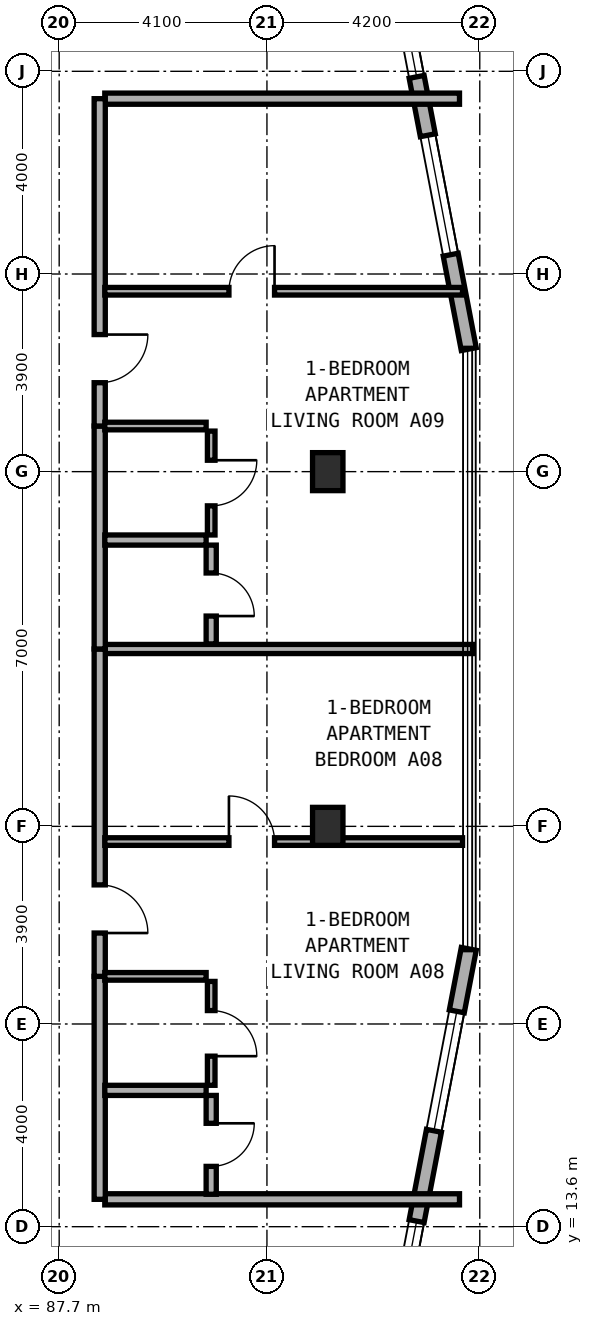
"""IFC4 building model, lengths in metres.
Left out: names, types, materials, properties, quantities, classifications, styles, units other than length and angle.
Written with IfcOpenShell. Run it as: python <this file> out.ifc"""

import sys

from ifc_helpers import new_model, si_unit, direction, frame, frame_2d, origin, origin_2d, place, context, subcontext, project, spatial, rectangle, extrude, element, fill, save


model = new_model("IFC4")
c1 = context("Model", 3, precision=1e-05, world=origin(), true_north=direction((0.0, 1.0)))
c2 = subcontext(c1, "Body", "Model", "MODEL_VIEW")
j1 = project(units=[si_unit("LENGTHUNIT", "METRE"), si_unit("PLANEANGLEUNIT", "RADIAN")], contexts=[c1])
p1 = place(None, origin())
s1 = spatial("IfcSite", under=j1, at=p1, CompositionType="ELEMENT")
p2 = place(p1, origin())
s2 = spatial("IfcBuilding", under=s1, at=p2, CompositionType="ELEMENT")
p3 = place(p2, frame((0.0, 0.0, 73.0)))
s3 = spatial("IfcBuildingStorey", under=s2, at=p3, CompositionType="ELEMENT", Elevation=73.0)
for number, where, z_axis, x_axis in (
    (1, (93.0, 21.5, 0.0), (0.0, 0.0, 1.0), (1.0, 0.0, 0.0)),
    (2, (93.0, 28.5, 0.0), (0.0, 0.0, 1.0), (1.0, 0.0, 0.0)),
):
    element("IfcColumn", number, at=place(p3, frame(where, z_axis=z_axis, x_axis=x_axis)), inside=s3, PredefinedType="COLUMN", context=c2, shape_type="SweptSolid", body=[
        extrude(rectangle(XDim=0.6, YDim=0.75, at=origin_2d()), origin(), (0.0, 0.0, 1.0), 3.5),
    ])
p4 = place(p3, frame((93.971, 9.62, 0.0), z_axis=(0.0, 0.0, 1.0), x_axis=(0.188087874316, 0.982152203854, 0.0)))
e3 = element("IfcWall", 3, at=p4, inside=s3, PredefinedType="STANDARD", context=c2, shape_type="SweptSolid", body=[
    extrude(rectangle(XDim=9.634, YDim=0.3, at=frame_2d((4.817, 0.0))), origin(), (0.0, 0.0, 1.0), 3.25),
])
p5 = place(p4, frame((0.452, 0.0, 0.85)))
e4 = element("IfcOpeningElement", 4, at=p5, cuts=e3, PredefinedType="OPENING", context=c2, shape_type="SweptSolid", body=[
    extrude(rectangle(XDim=1.5, YDim=1.5, at=frame_2d((0.75, 0.75))), frame((0.0, 0.16, 0.0), z_axis=(0.0, -1.0, 0.0), x_axis=(1.0, 0.0, 0.0)), (0.0, 0.0, 1.0), 0.32),
])
p6 = place(p4, frame((2.964, 0.0, 0.85)))
e5 = element("IfcOpeningElement", 5, at=p6, cuts=e3, PredefinedType="OPENING", context=c2, shape_type="SweptSolid", body=[
    extrude(rectangle(XDim=1.2, YDim=1.5, at=frame_2d((0.6, 0.75))), frame((0.0, 0.16, 0.0), z_axis=(0.0, -1.0, 0.0), x_axis=(1.0, 0.0, 0.0)), (0.0, 0.0, 1.0), 0.32),
])
p7 = place(p4, frame((5.979, 0.0, 0.8)))
e6 = element("IfcOpeningElement", 6, at=p7, cuts=e3, PredefinedType="OPENING", context=c2, shape_type="SweptSolid", body=[
    extrude(rectangle(XDim=2.4, YDim=1.6, at=frame_2d((1.2, 0.8))), frame((0.0, 0.16, 0.0), z_axis=(0.0, -1.0, 0.0), x_axis=(1.0, 0.0, 0.0)), (0.0, 0.0, 1.0), 0.32),
])
p8 = place(p3, frame((95.783, 30.918, 0.0), z_axis=(0.0, 0.0, 1.0), x_axis=(-0.188087874316, 0.982152203854, 0.0)))
e7 = element("IfcWall", 7, at=p8, inside=s3, PredefinedType="STANDARD", context=c2, shape_type="SweptSolid", body=[
    extrude(rectangle(XDim=9.634, YDim=0.3, at=frame_2d((4.817, 0.0))), origin(), (0.0, 0.0, 1.0), 3.25),
])
p9 = place(p8, frame((1.897, 0.0, 0.8)))
e8 = element("IfcOpeningElement", 8, at=p9, cuts=e7, PredefinedType="OPENING", context=c2, shape_type="SweptSolid", body=[
    extrude(rectangle(XDim=2.4, YDim=1.6, at=frame_2d((1.2, 0.8))), frame((0.0, 0.16, 0.0), z_axis=(0.0, -1.0, 0.0), x_axis=(1.0, 0.0, 0.0)), (0.0, 0.0, 1.0), 0.32),
])
p10 = place(p8, frame((5.47, 0.0, 0.85)))
e9 = element("IfcOpeningElement", 9, at=p10, cuts=e7, PredefinedType="OPENING", context=c2, shape_type="SweptSolid", body=[
    extrude(rectangle(XDim=1.2, YDim=1.5, at=frame_2d((0.6, 0.75))), frame((0.0, 0.16, 0.0), z_axis=(0.0, -1.0, 0.0), x_axis=(1.0, 0.0, 0.0)), (0.0, 0.0, 1.0), 0.32),
])
p11 = place(p8, frame((7.682, 0.0, 0.85)))
e10 = element("IfcOpeningElement", 10, at=p11, cuts=e7, PredefinedType="OPENING", context=c2, shape_type="SweptSolid", body=[
    extrude(rectangle(XDim=1.5, YDim=1.5, at=frame_2d((0.75, 0.75))), frame((0.0, 0.16, 0.0), z_axis=(0.0, -1.0, 0.0), x_axis=(1.0, 0.0, 0.0)), (0.0, 0.0, 1.0), 0.32),
])
for number, where, z_axis, x_axis in (
    (11, (88.6, 14.14, 0.0), (0.0, 0.0, 1.0), (1.0, 0.0, 0.0)),
    (12, (88.6, 35.86, 0.0), (0.0, 0.0, 1.0), (1.0, 0.0, 0.0)),
):
    element("IfcWall", number, at=place(p3, frame(where, z_axis=z_axis, x_axis=x_axis)), inside=s3, PredefinedType="SOLIDWALL", context=c2, shape_type="SweptSolid", body=[
        extrude(rectangle(XDim=7.0, YDim=0.22, at=frame_2d((3.5, 0.0))), origin(), (0.0, 0.0, 1.0), 2.865),
    ])
p12 = place(p3, frame((88.5, 25.0, 0.0), z_axis=(0.0, 0.0, 1.0), x_axis=(1.0, 0.0, 0.0)))
e13 = element("IfcWall", 13, at=p12, inside=s3, PredefinedType="SOLIDWALL", context=c2, shape_type="SweptSolid", body=[
    extrude(rectangle(XDim=7.36, YDim=0.18, at=frame_2d((3.68, 0.0))), origin(), (0.0, 0.0, 1.0), 2.865),
])
p13 = place(p3, frame((88.5, 14.14, 0.0), z_axis=(0.0, 0.0, 1.0), x_axis=(0.0, 1.0, 0.0)))
e14 = element("IfcWall", 14, at=p13, inside=s3, PredefinedType="SOLIDWALL", context=c2, shape_type="SweptSolid", body=[
    extrude(rectangle(XDim=4.4, YDim=0.22, at=frame_2d((2.2, 0.0))), origin(), (0.0, 0.0, 1.0), 3.22),
])
p14 = place(p3, frame((88.5, 18.54, 0.0), z_axis=(0.0, 0.0, 1.0), x_axis=(0.0, 1.0, 0.0)))
e15 = element("IfcWall", 15, at=p14, inside=s3, PredefinedType="SOLIDWALL", context=c2, shape_type="SweptSolid", body=[
    extrude(rectangle(XDim=6.46, YDim=0.22, at=frame_2d((3.23, 0.0))), origin(), (0.0, 0.0, 1.0), 2.725),
])
p15 = place(p14, frame((0.855, 0.0, 0.0)))
e16 = element("IfcOpeningElement", 16, at=p15, cuts=e15, PredefinedType="OPENING", context=c2, shape_type="SweptSolid", body=[
    extrude(rectangle(XDim=0.95, YDim=2.1, at=frame_2d((0.475, 1.05))), frame((0.0, 0.12, 0.0), z_axis=(0.0, -1.0, 0.0), x_axis=(1.0, 0.0, 0.0)), (0.0, 0.0, 1.0), 0.24),
])
p16 = place(p3, frame((88.6, 21.2, 0.0), z_axis=(0.0, 0.0, 1.0), x_axis=(1.0, 0.0, 0.0)))
e17 = element("IfcWall", 17, at=p16, inside=s3, PredefinedType="PARTITIONING", context=c2, shape_type="SweptSolid", body=[
    extrude(rectangle(XDim=7.06, YDim=0.15, at=frame_2d((3.53, 0.0))), origin(), (0.0, 0.0, 1.0), 2.865),
])
p17 = place(p16, frame((2.45, 0.0, 0.0)))
e18 = element("IfcOpeningElement", 18, at=p17, cuts=e17, PredefinedType="OPENING", context=c2, shape_type="SweptSolid", body=[
    extrude(rectangle(XDim=0.9, YDim=2.1, at=frame_2d((0.45, 1.05))), frame((0.0, 0.085, 0.0), z_axis=(0.0, -1.0, 0.0), x_axis=(1.0, 0.0, 0.0)), (0.0, 0.0, 1.0), 0.17),
])
p18 = place(p3, frame((88.6, 16.29, 0.0), z_axis=(0.0, 0.0, 1.0), x_axis=(1.0, 0.0, 0.0)))
e19 = element("IfcWall", 19, at=p18, inside=s3, PredefinedType="PLUMBINGWALL", context=c2, shape_type="SweptSolid", body=[
    extrude(rectangle(XDim=2.0, YDim=0.2, at=frame_2d((1.0, 0.0))), origin(), (0.0, 0.0, 1.0), 3.22),
])
p19 = place(p3, frame((88.6, 18.54, 0.0), z_axis=(0.0, 0.0, 1.0), x_axis=(1.0, 0.0, 0.0)))
e20 = element("IfcWall", 20, at=p19, inside=s3, PredefinedType="PARTITIONING", context=c2, shape_type="SweptSolid", body=[
    extrude(rectangle(XDim=2.0, YDim=0.15, at=frame_2d((1.0, 0.0))), origin(), (0.0, 0.0, 1.0), 3.22),
])
p20 = place(p3, frame((90.7, 14.24, 0.0), z_axis=(0.0, 0.0, 1.0), x_axis=(0.0, 1.0, 0.0)))
e21 = element("IfcWall", 21, at=p20, inside=s3, PredefinedType="PLUMBINGWALL", context=c2, shape_type="SweptSolid", body=[
    extrude(rectangle(XDim=1.95, YDim=0.2, at=frame_2d((0.975, 0.0))), origin(), (0.0, 0.0, 1.0), 3.22),
])
p21 = place(p20, frame((0.55, 0.0, 0.0)))
e22 = element("IfcOpeningElement", 22, at=p21, cuts=e21, PredefinedType="OPENING", context=c2, shape_type="SweptSolid", body=[
    extrude(rectangle(XDim=0.85, YDim=2.1, at=frame_2d((0.425, 1.05))), frame((0.0, 0.11, 0.0), z_axis=(0.0, -1.0, 0.0), x_axis=(1.0, 0.0, 0.0)), (0.0, 0.0, 1.0), 0.22),
])
p22 = place(p3, frame((90.7, 16.39, 0.0), z_axis=(0.0, 0.0, 1.0), x_axis=(0.0, 1.0, 0.0)))
e23 = element("IfcWall", 23, at=p22, inside=s3, PredefinedType="PARTITIONING", context=c2, shape_type="SweptSolid", body=[
    extrude(rectangle(XDim=2.05, YDim=0.15, at=frame_2d((1.025, 0.0))), origin(), (0.0, 0.0, 1.0), 3.22),
])
p23 = place(p22, frame((0.575, 0.0, 0.0)))
e24 = element("IfcOpeningElement", 24, at=p23, cuts=e23, PredefinedType="OPENING", context=c2, shape_type="SweptSolid", body=[
    extrude(rectangle(XDim=0.9, YDim=2.1, at=frame_2d((0.45, 1.05))), frame((0.0, 0.085, 0.0), z_axis=(0.0, -1.0, 0.0), x_axis=(1.0, 0.0, 0.0)), (0.0, 0.0, 1.0), 0.17),
])
p24 = place(p3, frame((88.5, 25.0, 0.0), z_axis=(0.0, 0.0, 1.0), x_axis=(0.0, 1.0, 0.0)))
e25 = element("IfcWall", 25, at=p24, inside=s3, PredefinedType="SOLIDWALL", context=c2, shape_type="SweptSolid", body=[
    extrude(rectangle(XDim=4.4, YDim=0.22, at=frame_2d((2.2, 0.0))), origin(), (0.0, 0.0, 1.0), 2.725),
])
p25 = place(p3, frame((88.5, 29.4, 0.0), z_axis=(0.0, 0.0, 1.0), x_axis=(0.0, 1.0, 0.0)))
e26 = element("IfcWall", 26, at=p25, inside=s3, PredefinedType="SOLIDWALL", context=c2, shape_type="SweptSolid", body=[
    extrude(rectangle(XDim=6.46, YDim=0.22, at=frame_2d((3.23, 0.0))), origin(), (0.0, 0.0, 1.0), 3.22),
])
p26 = place(p25, frame((0.855, 0.0, 0.0)))
e27 = element("IfcOpeningElement", 27, at=p26, cuts=e26, PredefinedType="OPENING", context=c2, shape_type="SweptSolid", body=[
    extrude(rectangle(XDim=0.95, YDim=2.1, at=frame_2d((0.475, 1.05))), frame((0.0, 0.12, 0.0), z_axis=(0.0, -1.0, 0.0), x_axis=(1.0, 0.0, 0.0)), (0.0, 0.0, 1.0), 0.24),
])
p27 = place(p3, frame((88.6, 32.06, 0.0), z_axis=(0.0, 0.0, 1.0), x_axis=(1.0, 0.0, 0.0)))
e28 = element("IfcWall", 28, at=p27, inside=s3, PredefinedType="PARTITIONING", context=c2, shape_type="SweptSolid", body=[
    extrude(rectangle(XDim=7.06, YDim=0.15, at=frame_2d((3.53, 0.0))), origin(), (0.0, 0.0, 1.0), 2.865),
])
p28 = place(p27, frame((2.45, 0.0, 0.0)))
e29 = element("IfcOpeningElement", 29, at=p28, cuts=e28, PredefinedType="OPENING", context=c2, shape_type="SweptSolid", body=[
    extrude(rectangle(XDim=0.9, YDim=2.1, at=frame_2d((0.45, 1.05))), frame((0.0, 0.085, 0.0), z_axis=(0.0, -1.0, 0.0), x_axis=(1.0, 0.0, 0.0)), (0.0, 0.0, 1.0), 0.17),
])
p29 = place(p3, frame((88.6, 27.15, 0.0), z_axis=(0.0, 0.0, 1.0), x_axis=(1.0, 0.0, 0.0)))
e30 = element("IfcWall", 30, at=p29, inside=s3, PredefinedType="PLUMBINGWALL", context=c2, shape_type="SweptSolid", body=[
    extrude(rectangle(XDim=2.0, YDim=0.2, at=frame_2d((1.0, 0.0))), origin(), (0.0, 0.0, 1.0), 3.22),
])
p30 = place(p3, frame((88.6, 29.4, 0.0), z_axis=(0.0, 0.0, 1.0), x_axis=(1.0, 0.0, 0.0)))
e31 = element("IfcWall", 31, at=p30, inside=s3, PredefinedType="PARTITIONING", context=c2, shape_type="SweptSolid", body=[
    extrude(rectangle(XDim=2.0, YDim=0.15, at=frame_2d((1.0, 0.0))), origin(), (0.0, 0.0, 1.0), 3.22),
])
p31 = place(p3, frame((90.7, 25.1, 0.0), z_axis=(0.0, 0.0, 1.0), x_axis=(0.0, 1.0, 0.0)))
e32 = element("IfcWall", 32, at=p31, inside=s3, PredefinedType="PLUMBINGWALL", context=c2, shape_type="SweptSolid", body=[
    extrude(rectangle(XDim=1.95, YDim=0.2, at=frame_2d((0.975, 0.0))), origin(), (0.0, 0.0, 1.0), 3.22),
])
p32 = place(p31, frame((0.55, 0.0, 0.0)))
e33 = element("IfcOpeningElement", 33, at=p32, cuts=e32, PredefinedType="OPENING", context=c2, shape_type="SweptSolid", body=[
    extrude(rectangle(XDim=0.85, YDim=2.1, at=frame_2d((0.425, 1.05))), frame((0.0, 0.11, 0.0), z_axis=(0.0, -1.0, 0.0), x_axis=(1.0, 0.0, 0.0)), (0.0, 0.0, 1.0), 0.22),
])
p33 = place(p3, frame((90.7, 27.25, 0.0), z_axis=(0.0, 0.0, 1.0), x_axis=(0.0, 1.0, 0.0)))
e34 = element("IfcWall", 34, at=p33, inside=s3, PredefinedType="PARTITIONING", context=c2, shape_type="SweptSolid", body=[
    extrude(rectangle(XDim=2.05, YDim=0.15, at=frame_2d((1.025, 0.0))), origin(), (0.0, 0.0, 1.0), 2.725),
])
p34 = place(p33, frame((0.575, 0.0, 0.0)))
e35 = element("IfcOpeningElement", 35, at=p34, cuts=e34, PredefinedType="OPENING", context=c2, shape_type="SweptSolid", body=[
    extrude(rectangle(XDim=0.9, YDim=2.1, at=frame_2d((0.45, 1.05))), frame((0.0, 0.085, 0.0), z_axis=(0.0, -1.0, 0.0), x_axis=(1.0, 0.0, 0.0)), (0.0, 0.0, 1.0), 0.17),
])
p35 = place(p6, origin())
e36 = element("IfcWindow", 36, at=p35, inside=s3, PartitioningType="SINGLE_PANEL", PredefinedType="WINDOW", context=c2, shape_type="SweptSolid", body=[
    extrude(rectangle(XDim=1.2, YDim=1.5, at=frame_2d((0.6, 0.75))), frame((0.0, 0.03, 0.0), z_axis=(0.0, -1.0, 0.0), x_axis=(1.0, 0.0, 0.0)), (0.0, 0.0, 1.0), 0.06),
])
fill(e5, e36)
p36 = place(p7, origin())
e37 = element("IfcWindow", 37, at=p36, inside=s3, PartitioningType="SINGLE_PANEL", PredefinedType="WINDOW", context=c2, shape_type="SweptSolid", body=[
    extrude(rectangle(XDim=2.4, YDim=1.6, at=frame_2d((1.2, 0.8))), frame((0.0, 0.03, 0.0), z_axis=(0.0, -1.0, 0.0), x_axis=(1.0, 0.0, 0.0)), (0.0, 0.0, 1.0), 0.06),
])
fill(e6, e37)
p37 = place(p9, origin())
e38 = element("IfcWindow", 38, at=p37, inside=s3, PartitioningType="SINGLE_PANEL", PredefinedType="WINDOW", context=c2, shape_type="SweptSolid", body=[
    extrude(rectangle(XDim=2.4, YDim=1.6, at=frame_2d((1.2, 0.8))), frame((0.0, 0.03, 0.0), z_axis=(0.0, -1.0, 0.0), x_axis=(1.0, 0.0, 0.0)), (0.0, 0.0, 1.0), 0.06),
])
fill(e8, e38)
p38 = place(p10, origin())
e39 = element("IfcWindow", 39, at=p38, inside=s3, PartitioningType="SINGLE_PANEL", PredefinedType="WINDOW", context=c2, shape_type="SweptSolid", body=[
    extrude(rectangle(XDim=1.2, YDim=1.5, at=frame_2d((0.6, 0.75))), frame((0.0, 0.03, 0.0), z_axis=(0.0, -1.0, 0.0), x_axis=(1.0, 0.0, 0.0)), (0.0, 0.0, 1.0), 0.06),
])
fill(e9, e39)
p39 = place(p15, frame((0.95, 0.0, 0.0), z_axis=(0.0, 0.0, 1.0), x_axis=(-1.0, 0.0, 0.0)))
e40 = element("IfcDoor", 40, at=p39, inside=s3, OperationType="SINGLE_SWING_RIGHT", PredefinedType="DOOR", context=c2, shape_type="SweptSolid", body=[
    extrude(rectangle(XDim=0.95, YDim=2.1, at=frame_2d((0.475, 1.05))), frame((0.0, 0.025, 0.0), z_axis=(0.0, -1.0, 0.0), x_axis=(1.0, 0.0, 0.0)), (0.0, 0.0, 1.0), 0.05),
])
fill(e16, e40)
p40 = place(p17, origin())
e41 = element("IfcDoor", 41, at=p40, inside=s3, OperationType="SINGLE_SWING_LEFT", PredefinedType="DOOR", context=c2, shape_type="SweptSolid", body=[
    extrude(rectangle(XDim=0.9, YDim=2.1, at=frame_2d((0.45, 1.05))), frame((0.0, 0.025, 0.0), z_axis=(0.0, -1.0, 0.0), x_axis=(1.0, 0.0, 0.0)), (0.0, 0.0, 1.0), 0.05),
])
fill(e18, e41)
p41 = place(p21, frame((0.85, 0.0, 0.0), z_axis=(0.0, 0.0, 1.0), x_axis=(-1.0, 0.0, 0.0)))
e42 = element("IfcDoor", 42, at=p41, inside=s3, OperationType="SINGLE_SWING_LEFT", PredefinedType="DOOR", context=c2, shape_type="SweptSolid", body=[
    extrude(rectangle(XDim=0.85, YDim=2.1, at=frame_2d((0.425, 1.05))), frame((0.0, 0.025, 0.0), z_axis=(0.0, -1.0, 0.0), x_axis=(1.0, 0.0, 0.0)), (0.0, 0.0, 1.0), 0.05),
])
fill(e22, e42)
p42 = place(p23, frame((0.9, 0.0, 0.0), z_axis=(0.0, 0.0, 1.0), x_axis=(-1.0, 0.0, 0.0)))
e43 = element("IfcDoor", 43, at=p42, inside=s3, OperationType="SINGLE_SWING_RIGHT", PredefinedType="DOOR", context=c2, shape_type="SweptSolid", body=[
    extrude(rectangle(XDim=0.9, YDim=2.1, at=frame_2d((0.45, 1.05))), frame((0.0, 0.025, 0.0), z_axis=(0.0, -1.0, 0.0), x_axis=(1.0, 0.0, 0.0)), (0.0, 0.0, 1.0), 0.05),
])
fill(e24, e43)
p43 = place(p26, frame((0.95, 0.0, 0.0), z_axis=(0.0, 0.0, 1.0), x_axis=(-1.0, 0.0, 0.0)))
e44 = element("IfcDoor", 44, at=p43, inside=s3, OperationType="SINGLE_SWING_LEFT", PredefinedType="DOOR", context=c2, shape_type="SweptSolid", body=[
    extrude(rectangle(XDim=0.95, YDim=2.1, at=frame_2d((0.475, 1.05))), frame((0.0, 0.025, 0.0), z_axis=(0.0, -1.0, 0.0), x_axis=(1.0, 0.0, 0.0)), (0.0, 0.0, 1.0), 0.05),
])
fill(e27, e44)
p44 = place(p28, origin())
e45 = element("IfcDoor", 45, at=p44, inside=s3, OperationType="SINGLE_SWING_RIGHT", PredefinedType="DOOR", context=c2, shape_type="SweptSolid", body=[
    extrude(rectangle(XDim=0.9, YDim=2.1, at=frame_2d((0.45, 1.05))), frame((0.0, 0.025, 0.0), z_axis=(0.0, -1.0, 0.0), x_axis=(1.0, 0.0, 0.0)), (0.0, 0.0, 1.0), 0.05),
])
fill(e29, e45)
p45 = place(p32, frame((0.85, 0.0, 0.0), z_axis=(0.0, 0.0, 1.0), x_axis=(-1.0, 0.0, 0.0)))
e46 = element("IfcDoor", 46, at=p45, inside=s3, OperationType="SINGLE_SWING_RIGHT", PredefinedType="DOOR", context=c2, shape_type="SweptSolid", body=[
    extrude(rectangle(XDim=0.85, YDim=2.1, at=frame_2d((0.425, 1.05))), frame((0.0, 0.025, 0.0), z_axis=(0.0, -1.0, 0.0), x_axis=(1.0, 0.0, 0.0)), (0.0, 0.0, 1.0), 0.05),
])
fill(e33, e46)
p46 = place(p34, frame((0.9, 0.0, 0.0), z_axis=(0.0, 0.0, 1.0), x_axis=(-1.0, 0.0, 0.0)))
e47 = element("IfcDoor", 47, at=p46, inside=s3, OperationType="SINGLE_SWING_LEFT", PredefinedType="DOOR", context=c2, shape_type="SweptSolid", body=[
    extrude(rectangle(XDim=0.9, YDim=2.1, at=frame_2d((0.45, 1.05))), frame((0.0, 0.025, 0.0), z_axis=(0.0, -1.0, 0.0), x_axis=(1.0, 0.0, 0.0)), (0.0, 0.0, 1.0), 0.05),
])
fill(e35, e47)
save(model, sys.argv[1])
